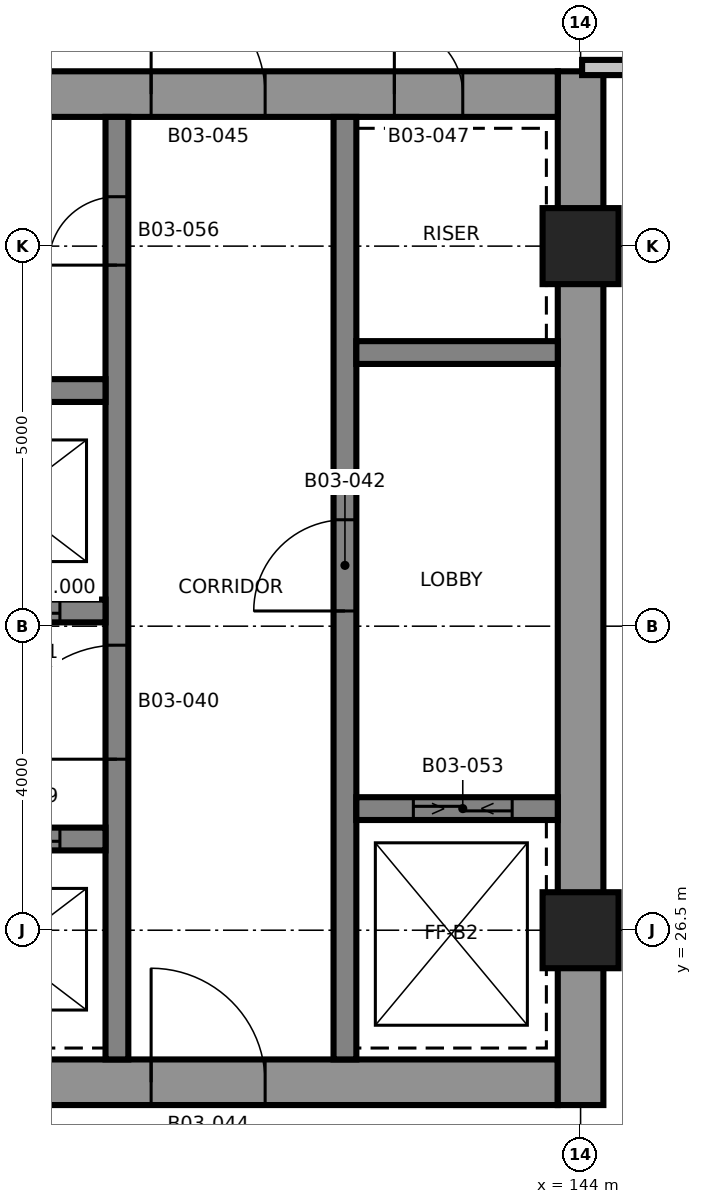
"""IFC4 building model, lengths in metres.
Left out: names, types, materials, properties, quantities, classifications, styles, units other than length and angle.
Written with IfcOpenShell. Run it as: python <this file> out.ifc"""

import sys

from ifc_helpers import new_model, si_unit, direction, frame, frame_2d, origin, origin_2d, place, context, subcontext, project, spatial, rectangle, extrude, element, fill, save


model = new_model("IFC4")
c1 = context("Model", 3, precision=1e-05, world=origin(), true_north=direction((0.0, 1.0)))
c2 = subcontext(c1, "Body", "Model", "MODEL_VIEW")
j1 = project(units=[si_unit("LENGTHUNIT", "METRE"), si_unit("PLANEANGLEUNIT", "RADIAN")], contexts=[c1])
p1 = place(None, origin())
s1 = spatial("IfcSite", under=j1, at=p1, CompositionType="ELEMENT")
p2 = place(p1, origin())
s2 = spatial("IfcBuilding", under=s1, at=p2, CompositionType="ELEMENT")
p3 = place(p2, frame((0.0, 0.0, 52.0)))
s3 = spatial("IfcBuildingStorey", under=s2, at=p3, CompositionType="ELEMENT", Elevation=52.0)
p4 = place(p3, frame((128.7, 24.5, 0.0), z_axis=(0.0, 0.0, 1.0), x_axis=(1.0, 0.0, 0.0)))
e1 = element("IfcWall", 1, at=p4, inside=s3, PredefinedType="SHEAR", context=c2, shape_type="SweptSolid", body=[
    extrude(rectangle(XDim=15.0, YDim=0.6, at=frame_2d((7.5, 0.0))), origin(), (0.0, 0.0, 1.0), 3.7),
])
p5 = place(p4, frame((9.65, 0.0, 0.0)))
e2 = element("IfcOpeningElement", 2, at=p5, cuts=e1, PredefinedType="OPENING", context=c2, shape_type="SweptSolid", body=[
    extrude(rectangle(XDim=1.5, YDim=2.1, at=frame_2d((0.75, 1.05))), frame((0.0, 0.31, 0.0), z_axis=(0.0, -1.0, 0.0), x_axis=(1.0, 0.0, 0.0)), (0.0, 0.0, 1.0), 0.62),
])
p6 = place(p4, frame((1.25, 0.0, 0.0)))
e3 = element("IfcOpeningElement", 3, at=p6, cuts=e1, PredefinedType="OPENING", context=c2, shape_type="SweptSolid", body=[
    extrude(rectangle(XDim=0.9, YDim=2.1, at=frame_2d((0.45, 1.05))), frame((0.0, 0.31, 0.0), z_axis=(0.0, -1.0, 0.0), x_axis=(1.0, 0.0, 0.0)), (0.0, 0.0, 1.0), 0.62),
])
p7 = place(p3, frame((144.0, 24.2, 0.0), z_axis=(0.0, 0.0, 1.0), x_axis=(0.0, 1.0, 0.0)))
e4 = element("IfcWall", 4, at=p7, inside=s3, PredefinedType="SHEAR", context=c2, shape_type="SweptSolid", body=[
    extrude(rectangle(XDim=13.6, YDim=0.6, at=frame_2d((6.8, 0.0))), origin(), (0.0, 0.0, 1.0), 3.7),
])
p8 = place(p3, frame((128.7, 37.5, 0.0), z_axis=(0.0, 0.0, 1.0), x_axis=(1.0, 0.0, 0.0)))
e5 = element("IfcWall", 5, at=p8, inside=s3, PredefinedType="SHEAR", context=c2, shape_type="SweptSolid", body=[
    extrude(rectangle(XDim=15.0, YDim=0.6, at=frame_2d((7.5, 0.0))), origin(), (0.0, 0.0, 1.0), 3.7),
])
p9 = place(p8, frame((9.65, 0.0, 0.0)))
e6 = element("IfcOpeningElement", 6, at=p9, cuts=e5, PredefinedType="OPENING", context=c2, shape_type="SweptSolid", body=[
    extrude(rectangle(XDim=1.5, YDim=2.1, at=frame_2d((0.75, 1.05))), frame((0.0, 0.31, 0.0), z_axis=(0.0, -1.0, 0.0), x_axis=(1.0, 0.0, 0.0)), (0.0, 0.0, 1.0), 0.62),
])
p10 = place(p8, frame((12.85, 0.0, 0.0)))
e7 = element("IfcOpeningElement", 7, at=p10, cuts=e5, PredefinedType="OPENING", context=c2, shape_type="SweptSolid", body=[
    extrude(rectangle(XDim=0.9, YDim=2.1, at=frame_2d((0.45, 1.05))), frame((0.0, 0.31, 0.0), z_axis=(0.0, -1.0, 0.0), x_axis=(1.0, 0.0, 0.0)), (0.0, 0.0, 1.0), 0.62),
])
p11 = place(p8, frame((3.8, 0.0, 0.0)))
e8 = element("IfcOpeningElement", 8, at=p11, cuts=e5, PredefinedType="OPENING", context=c2, shape_type="SweptSolid", body=[
    extrude(rectangle(XDim=0.9, YDim=2.1, at=frame_2d((0.45, 1.05))), frame((0.0, 0.31, 0.0), z_axis=(0.0, -1.0, 0.0), x_axis=(1.0, 0.0, 0.0)), (0.0, 0.0, 1.0), 0.62),
])
p12 = place(p8, frame((6.7, 0.0, 0.0)))
e9 = element("IfcOpeningElement", 9, at=p12, cuts=e5, PredefinedType="OPENING", context=c2, shape_type="SweptSolid", body=[
    extrude(rectangle(XDim=0.9, YDim=2.1, at=frame_2d((0.45, 1.05))), frame((0.0, 0.31, 0.0), z_axis=(0.0, -1.0, 0.0), x_axis=(1.0, 0.0, 0.0)), (0.0, 0.0, 1.0), 0.62),
])
p13 = place(p3, frame((137.9, 24.8, 0.0), z_axis=(0.0, 0.0, 1.0), x_axis=(0.0, 1.0, 0.0)))
e10 = element("IfcWall", 10, at=p13, inside=s3, PredefinedType="SHEAR", context=c2, shape_type="SweptSolid", body=[
    extrude(rectangle(XDim=12.4, YDim=0.3, at=frame_2d((6.2, 0.0))), origin(), (0.0, 0.0, 1.0), 3.7),
])
p14 = place(p13, frame((3.95, 0.0, 0.0)))
e11 = element("IfcOpeningElement", 11, at=p14, cuts=e10, PredefinedType="OPENING", context=c2, shape_type="SweptSolid", body=[
    extrude(rectangle(XDim=1.5, YDim=2.1, at=frame_2d((0.75, 1.05))), frame((0.0, 0.16, 0.0), z_axis=(0.0, -1.0, 0.0), x_axis=(1.0, 0.0, 0.0)), (0.0, 0.0, 1.0), 0.32),
])
p15 = place(p13, frame((10.45, 0.0, 0.0)))
e12 = element("IfcOpeningElement", 12, at=p15, cuts=e10, PredefinedType="OPENING", context=c2, shape_type="SweptSolid", body=[
    extrude(rectangle(XDim=0.9, YDim=2.1, at=frame_2d((0.45, 1.05))), frame((0.0, 0.16, 0.0), z_axis=(0.0, -1.0, 0.0), x_axis=(1.0, 0.0, 0.0)), (0.0, 0.0, 1.0), 0.32),
])
p16 = place(p3, frame((140.9, 24.8, 0.0), z_axis=(0.0, 0.0, 1.0), x_axis=(0.0, 1.0, 0.0)))
e13 = element("IfcWall", 13, at=p16, inside=s3, PredefinedType="SHEAR", context=c2, shape_type="SweptSolid", body=[
    extrude(rectangle(XDim=12.4, YDim=0.3, at=frame_2d((6.2, 0.0))), origin(), (0.0, 0.0, 1.0), 3.7),
])
p17 = place(p16, frame((5.9, 0.0, 0.0)))
e14 = element("IfcOpeningElement", 14, at=p17, cuts=e13, PredefinedType="OPENING", context=c2, shape_type="SweptSolid", body=[
    extrude(rectangle(XDim=1.2, YDim=2.1, at=frame_2d((0.6, 1.05))), frame((0.0, 0.16, 0.0), z_axis=(0.0, -1.0, 0.0), x_axis=(1.0, 0.0, 0.0)), (0.0, 0.0, 1.0), 0.32),
])
p18 = place(p3, frame((132.25, 27.7, 0.0), z_axis=(0.0, 0.0, 1.0), x_axis=(1.0, 0.0, 0.0)))
e15 = element("IfcWall", 15, at=p18, inside=s3, PredefinedType="SHEAR", context=c2, shape_type="SweptSolid", body=[
    extrude(rectangle(XDim=5.5, YDim=0.3, at=frame_2d((2.75, 0.0))), origin(), (0.0, 0.0, 1.0), 3.7),
])
p19 = place(p18, frame((0.9, 0.0, 0.0)))
e16 = element("IfcOpeningElement", 16, at=p19, cuts=e15, PredefinedType="OPENING", context=c2, shape_type="SweptSolid", body=[
    extrude(rectangle(XDim=1.1, YDim=2.4, at=frame_2d((0.55, 1.2))), frame((0.0, 0.16, 0.0), z_axis=(0.0, -1.0, 0.0), x_axis=(1.0, 0.0, 0.0)), (0.0, 0.0, 1.0), 0.32),
])
p20 = place(p18, frame((3.8, 0.0, 0.0)))
e17 = element("IfcOpeningElement", 17, at=p20, cuts=e15, PredefinedType="OPENING", context=c2, shape_type="SweptSolid", body=[
    extrude(rectangle(XDim=1.1, YDim=2.4, at=frame_2d((0.55, 1.2))), frame((0.0, 0.16, 0.0), z_axis=(0.0, -1.0, 0.0), x_axis=(1.0, 0.0, 0.0)), (0.0, 0.0, 1.0), 0.32),
])
p21 = place(p3, frame((132.25, 30.7, 0.0), z_axis=(0.0, 0.0, 1.0), x_axis=(1.0, 0.0, 0.0)))
e18 = element("IfcWall", 18, at=p21, inside=s3, PredefinedType="SHEAR", context=c2, shape_type="SweptSolid", body=[
    extrude(rectangle(XDim=5.5, YDim=0.3, at=frame_2d((2.75, 0.0))), origin(), (0.0, 0.0, 1.0), 3.7),
])
p22 = place(p21, frame((0.9, 0.0, 0.0)))
e19 = element("IfcOpeningElement", 19, at=p22, cuts=e18, PredefinedType="OPENING", context=c2, shape_type="SweptSolid", body=[
    extrude(rectangle(XDim=1.1, YDim=2.4, at=frame_2d((0.55, 1.2))), frame((0.0, 0.16, 0.0), z_axis=(0.0, -1.0, 0.0), x_axis=(1.0, 0.0, 0.0)), (0.0, 0.0, 1.0), 0.32),
])
p23 = place(p21, frame((3.8, 0.0, 0.0)))
e20 = element("IfcOpeningElement", 20, at=p23, cuts=e18, PredefinedType="OPENING", context=c2, shape_type="SweptSolid", body=[
    extrude(rectangle(XDim=1.1, YDim=2.4, at=frame_2d((0.55, 1.2))), frame((0.0, 0.16, 0.0), z_axis=(0.0, -1.0, 0.0), x_axis=(1.0, 0.0, 0.0)), (0.0, 0.0, 1.0), 0.32),
])
p24 = place(p3, frame((132.25, 33.6, 0.0), z_axis=(0.0, 0.0, 1.0), x_axis=(1.0, 0.0, 0.0)))
e21 = element("IfcWall", 21, at=p24, inside=s3, PredefinedType="SHEAR", context=c2, shape_type="SweptSolid", body=[
    extrude(rectangle(XDim=5.5, YDim=0.3, at=frame_2d((2.75, 0.0))), origin(), (0.0, 0.0, 1.0), 3.7),
])
p25 = place(p3, frame((141.05, 28.1, 0.0), z_axis=(0.0, 0.0, 1.0), x_axis=(1.0, 0.0, 0.0)))
e22 = element("IfcWall", 22, at=p25, inside=s3, PredefinedType="SHEAR", context=c2, shape_type="SweptSolid", body=[
    extrude(rectangle(XDim=2.65, YDim=0.3, at=frame_2d((1.325, 0.0))), origin(), (0.0, 0.0, 1.0), 3.7),
])
p26 = place(p25, frame((0.75, 0.0, 0.0)))
e23 = element("IfcOpeningElement", 23, at=p26, cuts=e22, PredefinedType="OPENING", context=c2, shape_type="SweptSolid", body=[
    extrude(rectangle(XDim=1.3, YDim=2.4, at=frame_2d((0.65, 1.2))), frame((0.0, 0.16, 0.0), z_axis=(0.0, -1.0, 0.0), x_axis=(1.0, 0.0, 0.0)), (0.0, 0.0, 1.0), 0.32),
])
p27 = place(p3, frame((141.05, 34.1, 0.0), z_axis=(0.0, 0.0, 1.0), x_axis=(1.0, 0.0, 0.0)))
e24 = element("IfcWall", 24, at=p27, inside=s3, PredefinedType="SHEAR", context=c2, shape_type="SweptSolid", body=[
    extrude(rectangle(XDim=2.65, YDim=0.3, at=frame_2d((1.325, 0.0))), origin(), (0.0, 0.0, 1.0), 3.7),
])
for number, where, z_axis, x_axis in (
    (25, (144.0, 26.5, 0.0), (0.0, 0.0, 1.0), (1.0, 0.0, 0.0)),
    (26, (144.0, 35.5, 0.0), (0.0, 0.0, 1.0), (1.0, 0.0, 0.0)),
):
    element("IfcColumn", number, at=place(p3, frame(where, z_axis=z_axis, x_axis=x_axis)), inside=s3, PredefinedType="COLUMN", context=c2, shape_type="SweptSolid", body=[
        extrude(rectangle(XDim=1.0, YDim=1.0, at=origin_2d()), origin(), (0.0, 0.0, 1.0), 3.7),
    ])
p28 = place(p3, frame((144.02, 37.85, 0.0), z_axis=(0.0, 0.0, 1.0), x_axis=(1.0, 0.0, 0.0)))
e27 = element("IfcWall", 27, at=p28, inside=s3, PredefinedType="PARTITIONING", context=c2, shape_type="SweptSolid", body=[
    extrude(rectangle(XDim=3.23, YDim=0.2, at=frame_2d((1.615, 0.0))), origin(), (0.0, 0.0, 1.0), 3.4),
])
p29 = place(p28, frame((1.03, 0.0, 0.0)))
e28 = element("IfcOpeningElement", 28, at=p29, cuts=e27, PredefinedType="OPENING", context=c2, shape_type="SweptSolid", body=[
    extrude(rectangle(XDim=1.5, YDim=2.1, at=frame_2d((0.75, 1.05))), frame((0.0, 0.11, 0.0), z_axis=(0.0, -1.0, 0.0), x_axis=(1.0, 0.0, 0.0)), (0.0, 0.0, 1.0), 0.22),
])
p30 = place(p14, origin())
e29 = element("IfcDoor", 29, at=p30, inside=s3, OperationType="SINGLE_SWING_RIGHT", PredefinedType="DOOR", context=c2, shape_type="SweptSolid", body=[
    extrude(rectangle(XDim=1.5, YDim=2.1, at=frame_2d((0.75, 1.05))), frame((0.0, 0.025, 0.0), z_axis=(0.0, -1.0, 0.0), x_axis=(1.0, 0.0, 0.0)), (0.0, 0.0, 1.0), 0.05),
])
fill(e11, e29)
p31 = place(p17, origin())
e30 = element("IfcDoor", 30, at=p31, inside=s3, OperationType="SINGLE_SWING_RIGHT", PredefinedType="DOOR", context=c2, shape_type="SweptSolid", body=[
    extrude(rectangle(XDim=1.2, YDim=2.1, at=frame_2d((0.6, 1.05))), frame((0.0, 0.025, 0.0), z_axis=(0.0, -1.0, 0.0), x_axis=(1.0, 0.0, 0.0)), (0.0, 0.0, 1.0), 0.05),
])
fill(e14, e30)
p32 = place(p5, origin())
e31 = element("IfcDoor", 31, at=p32, inside=s3, OperationType="SINGLE_SWING_LEFT", PredefinedType="DOOR", context=c2, shape_type="SweptSolid", body=[
    extrude(rectangle(XDim=1.5, YDim=2.1, at=frame_2d((0.75, 1.05))), frame((0.0, 0.025, 0.0), z_axis=(0.0, -1.0, 0.0), x_axis=(1.0, 0.0, 0.0)), (0.0, 0.0, 1.0), 0.05),
])
fill(e2, e31)
p33 = place(p9, origin())
e32 = element("IfcDoor", 32, at=p33, inside=s3, OperationType="SINGLE_SWING_RIGHT", PredefinedType="DOOR", context=c2, shape_type="SweptSolid", body=[
    extrude(rectangle(XDim=1.5, YDim=2.1, at=frame_2d((0.75, 1.05))), frame((0.0, 0.025, 0.0), z_axis=(0.0, -1.0, 0.0), x_axis=(1.0, 0.0, 0.0)), (0.0, 0.0, 1.0), 0.05),
])
fill(e6, e32)
p34 = place(p10, origin())
e33 = element("IfcDoor", 33, at=p34, inside=s3, OperationType="SINGLE_SWING_RIGHT", PredefinedType="DOOR", context=c2, shape_type="SweptSolid", body=[
    extrude(rectangle(XDim=0.9, YDim=2.1, at=frame_2d((0.45, 1.05))), frame((0.0, 0.025, 0.0), z_axis=(0.0, -1.0, 0.0), x_axis=(1.0, 0.0, 0.0)), (0.0, 0.0, 1.0), 0.05),
])
fill(e7, e33)
p35 = place(p20, origin())
e34 = element("IfcDoor", 34, at=p35, inside=s3, OperationType="SLIDING_TO_LEFT", PredefinedType="DOOR", context=c2, shape_type="SweptSolid", body=[
    extrude(rectangle(XDim=1.1, YDim=2.4, at=frame_2d((0.55, 1.2))), frame((0.0, 0.025, 0.0), z_axis=(0.0, -1.0, 0.0), x_axis=(1.0, 0.0, 0.0)), (0.0, 0.0, 1.0), 0.05),
])
fill(e17, e34)
p36 = place(p23, origin())
e35 = element("IfcDoor", 35, at=p36, inside=s3, OperationType="SLIDING_TO_LEFT", PredefinedType="DOOR", context=c2, shape_type="SweptSolid", body=[
    extrude(rectangle(XDim=1.1, YDim=2.4, at=frame_2d((0.55, 1.2))), frame((0.0, 0.025, 0.0), z_axis=(0.0, -1.0, 0.0), x_axis=(1.0, 0.0, 0.0)), (0.0, 0.0, 1.0), 0.05),
])
fill(e20, e35)
p37 = place(p26, origin())
e36 = element("IfcDoor", 36, at=p37, inside=s3, OperationType="SLIDING_TO_LEFT", PredefinedType="DOOR", context=c2, shape_type="SweptSolid", body=[
    extrude(rectangle(XDim=1.3, YDim=2.4, at=frame_2d((0.65, 1.2))), frame((0.0, 0.025, 0.0), z_axis=(0.0, -1.0, 0.0), x_axis=(1.0, 0.0, 0.0)), (0.0, 0.0, 1.0), 0.05),
])
fill(e23, e36)
p38 = place(p15, origin())
e37 = element("IfcDoor", 37, at=p38, inside=s3, OperationType="SINGLE_SWING_RIGHT", PredefinedType="DOOR", context=c2, shape_type="SweptSolid", body=[
    extrude(rectangle(XDim=0.9, YDim=2.1, at=frame_2d((0.45, 1.05))), frame((0.0, 0.025, 0.0), z_axis=(0.0, -1.0, 0.0), x_axis=(1.0, 0.0, 0.0)), (0.0, 0.0, 1.0), 0.05),
])
fill(e12, e37)
save(model, sys.argv[1])
